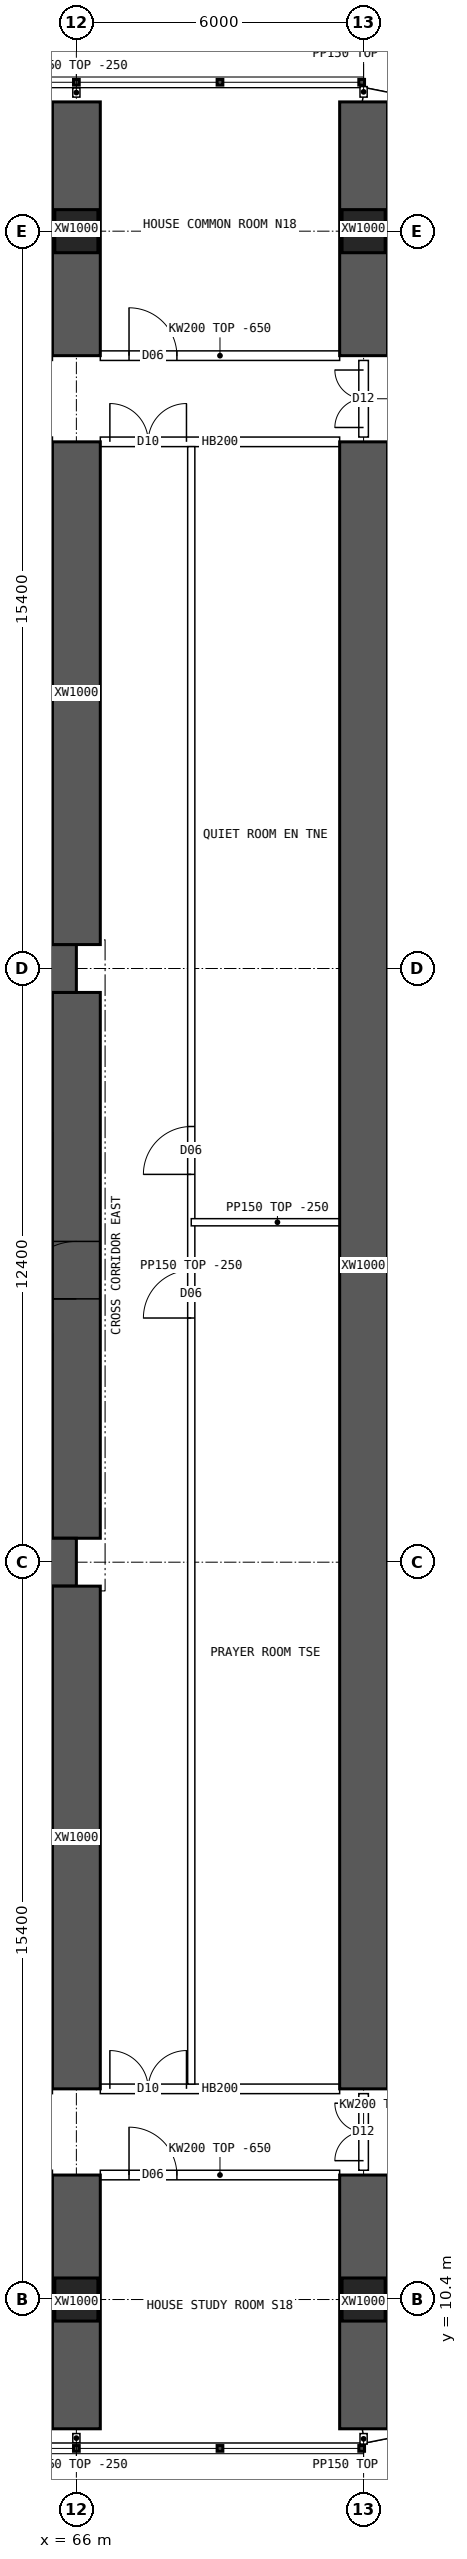
"""IFC4 building model, lengths in metres.
Left out: names, types, materials, properties, quantities, classifications, styles, units other than length and angle.
Written with IfcOpenShell. Run it as: python <this file> out.ifc"""

import sys

from ifc_helpers import new_model, si_unit, direction, frame, frame_2d, origin, origin_2d, place, context, subcontext, project, spatial, polyline, rectangle, hollow_rectangle, outline, extrude, element, fill, save


model = new_model("IFC4")
c1 = context("Model", 3, precision=1e-05, world=origin(), true_north=direction((0.0, 1.0)))
c2 = subcontext(c1, "Body", "Model", "MODEL_VIEW")
j1 = project(units=[si_unit("LENGTHUNIT", "METRE"), si_unit("PLANEANGLEUNIT", "RADIAN")], contexts=[c1])
p1 = place(None, origin())
s1 = spatial("IfcSite", under=j1, at=p1, CompositionType="ELEMENT")
p2 = place(p1, origin())
s2 = spatial("IfcBuilding", under=s1, at=p2, CompositionType="ELEMENT")
p3 = place(p2, frame((0.0, 0.0, 57.7)))
s3 = spatial("IfcBuildingStorey", under=s2, at=p3, CompositionType="ELEMENT", Elevation=57.7)
for number, where, z_axis, x_axis in (
    (1, (66.0, 10.4, 0.0), (0.0, 0.0, 1.0), (1.0, 0.0, 0.0)),
    (2, (66.0, 53.6, 0.0), (0.0, 0.0, 1.0), (1.0, 0.0, 0.0)),
    (3, (72.0, 10.4, 0.0), (0.0, 0.0, 1.0), (1.0, 0.0, 0.0)),
    (4, (72.0, 53.6, 0.0), (0.0, 0.0, 1.0), (1.0, 0.0, 0.0)),
):
    element("IfcColumn", number, at=place(p3, frame(where, z_axis=z_axis, x_axis=x_axis)), inside=s3, PredefinedType="COLUMN", context=c2, shape_type="SweptSolid", body=[
        extrude(hollow_rectangle(XDim=0.9, YDim=0.9, WallThickness=0.09, at=origin_2d()), origin(), (0.0, 0.0, 1.0), 3.75),
    ])
for number, where, z_axis, x_axis in (
    (5, (18.0, 25.8, 0.0), (0.0, 0.0, 1.0), (1.0, 0.0, 0.0)),
    (6, (18.0, 38.2, 0.0), (0.0, 0.0, 1.0), (1.0, 0.0, 0.0)),
):
    element("IfcWall", number, at=place(p3, frame(where, z_axis=z_axis, x_axis=x_axis)), inside=s3, PredefinedType="SHEAR", context=c2, shape_type="SweptSolid", body=[
        extrude(rectangle(XDim=48.0, YDim=1.0, at=frame_2d((24.0, 0.0))), origin(), (0.0, 0.0, 1.0), 3.75),
    ])
p4 = place(p3, frame((66.0, 26.3, 0.0), z_axis=(0.0, 0.0, 1.0), x_axis=(0.0, 1.0, 0.0)))
e7 = element("IfcWall", 7, at=p4, inside=s3, PredefinedType="SHEAR", context=c2, shape_type="SweptSolid", body=[
    extrude(rectangle(XDim=11.4, YDim=1.0, at=frame_2d((5.7, 0.0))), origin(), (0.0, 0.0, 1.0), 3.75),
])
p5 = place(p4, frame((5.0, 0.0, 0.0)))
e8 = element("IfcOpeningElement", 8, at=p5, cuts=e7, PredefinedType="OPENING", context=c2, shape_type="SweptSolid", body=[
    extrude(rectangle(XDim=1.2, YDim=2.1, at=frame_2d((0.6, 1.05))), frame((0.0, 0.51, 0.0), z_axis=(0.0, -1.0, 0.0), x_axis=(1.0, 0.0, 0.0)), (0.0, 0.0, 1.0), 1.02),
])
for number, where, z_axis, x_axis in (
    (9, (66.0, 7.7, 0.0), (0.0, 0.0, 1.0), (0.0, 1.0, 0.0)),
    (10, (66.0, 51.0, 0.0), (0.0, 0.0, 1.0), (0.0, 1.0, 0.0)),
):
    element("IfcWall", number, at=place(p3, frame(where, z_axis=z_axis, x_axis=x_axis)), inside=s3, PredefinedType="SHEAR", context=c2, shape_type="SweptSolid", body=[
        extrude(rectangle(XDim=5.3, YDim=1.0, at=frame_2d((2.65, 0.0))), origin(), (0.0, 0.0, 1.0), 3.75),
    ])
for number, where, z_axis, x_axis in (
    (11, (66.0, 14.8, 0.0), (0.0, 0.0, 1.0), (0.0, 1.0, 0.0)),
    (12, (66.0, 38.7, 0.0), (0.0, 0.0, 1.0), (0.0, 1.0, 0.0)),
):
    element("IfcWall", number, at=place(p3, frame(where, z_axis=z_axis, x_axis=x_axis)), inside=s3, PredefinedType="SHEAR", context=c2, shape_type="SweptSolid", body=[
        extrude(rectangle(XDim=10.5, YDim=1.0, at=frame_2d((5.25, 0.0))), origin(), (0.0, 0.0, 1.0), 3.75),
    ])
for number, where, z_axis, x_axis in (
    (13, (72.0, 7.7, 0.0), (0.0, 0.0, 1.0), (0.0, 1.0, 0.0)),
    (14, (72.0, 51.0, 0.0), (0.0, 0.0, 1.0), (0.0, 1.0, 0.0)),
):
    element("IfcWall", number, at=place(p3, frame(where, z_axis=z_axis, x_axis=x_axis)), inside=s3, PredefinedType="SHEAR", context=c2, shape_type="SweptSolid", body=[
        extrude(rectangle(XDim=5.3, YDim=1.0, at=frame_2d((2.65, 0.0))), origin(), (0.0, 0.0, 1.0), 3.75),
    ])
p6 = place(p3, frame((72.0, 14.8, 0.0), z_axis=(0.0, 0.0, 1.0), x_axis=(0.0, 1.0, 0.0)))
e15 = element("IfcWall", 15, at=p6, inside=s3, PredefinedType="SHEAR", context=c2, shape_type="SweptSolid", body=[
    extrude(rectangle(XDim=34.4, YDim=1.0, at=frame_2d((17.2, 0.0))), origin(), (0.0, 0.0, 1.0), 3.75),
])
p7 = place(p3, frame((72.0, 7.55, 0.0), z_axis=(0.0, 0.0, 1.0), x_axis=(0.980787251524, 0.195080412259, 0.0)))
e16 = element("IfcWall", 16, at=p7, inside=s3, PredefinedType="SOLIDWALL", context=c2, shape_type="SweptSolid", body=[
    extrude(outline(polyline([(-0.03, -0.15), (3.249, -0.15), (3.189, 0.15), (0.03, 0.15), (-0.03, -0.15)])), origin(), (0.0, 0.0, 1.0), 3.5),
])
p8 = place(p7, frame((0.909, 0.0, 0.9)))
e17 = element("IfcOpeningElement", 17, at=p8, cuts=e16, PredefinedType="OPENING", context=c2, shape_type="SweptSolid", body=[
    extrude(rectangle(XDim=1.4, YDim=1.8, at=frame_2d((0.7, 0.9))), frame((0.0, 0.16, 0.0), z_axis=(0.0, -1.0, 0.0), x_axis=(1.0, 0.0, 0.0)), (0.0, 0.0, 1.0), 0.32),
])
p9 = place(p3, frame((75.157, 55.822, 0.0), z_axis=(0.0, 0.0, 1.0), x_axis=(-0.980787251524, 0.195080412259, 0.0)))
e18 = element("IfcWall", 18, at=p9, inside=s3, PredefinedType="SOLIDWALL", context=c2, shape_type="SweptSolid", body=[
    extrude(outline(polyline([(-0.03, -0.15), (3.249, -0.15), (3.189, 0.15), (0.03, 0.15), (-0.03, -0.15)])), origin(), (0.0, 0.0, 1.0), 3.5),
])
p10 = place(p9, frame((0.909, 0.0, 0.9)))
e19 = element("IfcOpeningElement", 19, at=p10, cuts=e18, PredefinedType="OPENING", context=c2, shape_type="SweptSolid", body=[
    extrude(rectangle(XDim=1.4, YDim=1.8, at=frame_2d((0.7, 0.9))), frame((0.0, 0.16, 0.0), z_axis=(0.0, -1.0, 0.0), x_axis=(1.0, 0.0, 0.0)), (0.0, 0.0, 1.0), 0.32),
])
p11 = place(p3, frame((66.5, 13.0, 0.0), z_axis=(0.0, 0.0, 1.0), x_axis=(1.0, 0.0, 0.0)))
e20 = element("IfcWall", 20, at=p11, inside=s3, PredefinedType="SOLIDWALL", context=c2, shape_type="SweptSolid", body=[
    extrude(outline(polyline([(0.0, 0.0), (5.0, 0.0), (5.0, 3.1), (0.0, 3.1), (0.0, 0.0)])), frame((0.0, 0.1, 0.0), z_axis=(0.0, -1.0, 0.0), x_axis=(1.0, 0.0, 0.0)), (0.0, 0.0, 1.0), 0.2),
])
p12 = place(p11, frame((0.6, 0.0, 0.0)))
e21 = element("IfcOpeningElement", 21, at=p12, cuts=e20, PredefinedType="OPENING", context=c2, shape_type="SweptSolid", body=[
    extrude(rectangle(XDim=1.0, YDim=2.1, at=frame_2d((0.5, 1.05))), frame((0.0, 0.11, 0.0), z_axis=(0.0, -1.0, 0.0), x_axis=(1.0, 0.0, 0.0)), (0.0, 0.0, 1.0), 0.22),
])
p13 = place(p3, frame((66.5, 14.8, 0.0), z_axis=(0.0, 0.0, 1.0), x_axis=(1.0, 0.0, 0.0)))
e22 = element("IfcWall", 22, at=p13, inside=s3, PredefinedType="SOLIDWALL", context=c2, shape_type="SweptSolid", body=[
    extrude(rectangle(XDim=5.0, YDim=0.2, at=frame_2d((2.5, 0.0))), origin(), (0.0, 0.0, 1.0), 3.5),
])
p14 = place(p13, frame((0.2, 0.0, 0.0)))
e23 = element("IfcOpeningElement", 23, at=p14, cuts=e22, PredefinedType="OPENING", context=c2, shape_type="SweptSolid", body=[
    extrude(rectangle(XDim=1.6, YDim=2.1, at=frame_2d((0.8, 1.05))), frame((0.0, 0.11, 0.0), z_axis=(0.0, -1.0, 0.0), x_axis=(1.0, 0.0, 0.0)), (0.0, 0.0, 1.0), 0.22),
])
p15 = place(p3, frame((66.5, 51.0, 0.0), z_axis=(0.0, 0.0, 1.0), x_axis=(1.0, 0.0, 0.0)))
e24 = element("IfcWall", 24, at=p15, inside=s3, PredefinedType="SOLIDWALL", context=c2, shape_type="SweptSolid", body=[
    extrude(outline(polyline([(0.0, 0.0), (5.0, 0.0), (5.0, 3.1), (0.0, 3.1), (0.0, 0.0)])), frame((0.0, 0.1, 0.0), z_axis=(0.0, -1.0, 0.0), x_axis=(1.0, 0.0, 0.0)), (0.0, 0.0, 1.0), 0.2),
])
p16 = place(p15, frame((0.6, 0.0, 0.0)))
e25 = element("IfcOpeningElement", 25, at=p16, cuts=e24, PredefinedType="OPENING", context=c2, shape_type="SweptSolid", body=[
    extrude(rectangle(XDim=1.0, YDim=2.1, at=frame_2d((0.5, 1.05))), frame((0.0, 0.11, 0.0), z_axis=(0.0, -1.0, 0.0), x_axis=(1.0, 0.0, 0.0)), (0.0, 0.0, 1.0), 0.22),
])
p17 = place(p3, frame((66.5, 49.2, 0.0), z_axis=(0.0, 0.0, 1.0), x_axis=(1.0, 0.0, 0.0)))
e26 = element("IfcWall", 26, at=p17, inside=s3, PredefinedType="SOLIDWALL", context=c2, shape_type="SweptSolid", body=[
    extrude(rectangle(XDim=5.0, YDim=0.2, at=frame_2d((2.5, 0.0))), origin(), (0.0, 0.0, 1.0), 3.5),
])
p18 = place(p17, frame((0.2, 0.0, 0.0)))
e27 = element("IfcOpeningElement", 27, at=p18, cuts=e26, PredefinedType="OPENING", context=c2, shape_type="SweptSolid", body=[
    extrude(rectangle(XDim=1.6, YDim=2.1, at=frame_2d((0.8, 1.05))), frame((0.0, 0.11, 0.0), z_axis=(0.0, -1.0, 0.0), x_axis=(1.0, 0.0, 0.0)), (0.0, 0.0, 1.0), 0.22),
])
p19 = place(p3, frame((68.4, 14.9, 0.0), z_axis=(0.0, 0.0, 1.0), x_axis=(0.0, 1.0, 0.0)))
e28 = element("IfcWall", 28, at=p19, inside=s3, PredefinedType="PARTITIONING", context=c2, shape_type="SweptSolid", body=[
    extrude(rectangle(XDim=34.2, YDim=0.15, at=frame_2d((17.1, 0.0))), origin(), (0.0, 0.0, 1.0), 3.5),
])
p20 = place(p19, frame((16.0, 0.0, 0.0)))
e29 = element("IfcOpeningElement", 29, at=p20, cuts=e28, PredefinedType="OPENING", context=c2, shape_type="SweptSolid", body=[
    extrude(rectangle(XDim=1.0, YDim=2.1, at=frame_2d((0.5, 1.05))), frame((0.0, 0.085, 0.0), z_axis=(0.0, -1.0, 0.0), x_axis=(1.0, 0.0, 0.0)), (0.0, 0.0, 1.0), 0.17),
])
p21 = place(p19, frame((19.0, 0.0, 0.0)))
e30 = element("IfcOpeningElement", 30, at=p21, cuts=e28, PredefinedType="OPENING", context=c2, shape_type="SweptSolid", body=[
    extrude(rectangle(XDim=1.0, YDim=2.1, at=frame_2d((0.5, 1.05))), frame((0.0, 0.085, 0.0), z_axis=(0.0, -1.0, 0.0), x_axis=(1.0, 0.0, 0.0)), (0.0, 0.0, 1.0), 0.17),
])
p22 = place(p3, frame((68.4, 32.9, 0.0), z_axis=(0.0, 0.0, 1.0), x_axis=(1.0, 0.0, 0.0)))
e31 = element("IfcWall", 31, at=p22, inside=s3, PredefinedType="PARTITIONING", context=c2, shape_type="SweptSolid", body=[
    extrude(rectangle(XDim=3.6, YDim=0.15, at=frame_2d((1.8, 0.0))), origin(), (0.0, 0.0, 1.0), 3.5),
])
p23 = place(p3, frame((72.075, 30.85, 0.0), z_axis=(0.0, 0.0, 1.0), x_axis=(1.0, 0.0, 0.0)))
e32 = element("IfcWall", 32, at=p23, inside=s3, PredefinedType="PARTITIONING", context=c2, shape_type="SweptSolid", body=[
    extrude(outline(polyline([(0.0, 0.0), (8.02, 0.0), (8.02, 3.5), (6.227, 3.5), (6.225, 3.05), (5.627, 3.05), (5.625, 3.5), (0.0, 3.5), (0.0, 0.0)])), frame((0.0, 0.075, 0.0), z_axis=(0.0, -1.0, 0.0), x_axis=(1.0, 0.0, 0.0)), (0.0, 0.0, 1.0), 0.15),
])
p24 = place(p3, frame((72.0, 13.1, 0.0), z_axis=(0.0, 0.0, 1.0), x_axis=(0.0, 1.0, 0.0)))
e33 = element("IfcWall", 33, at=p24, inside=s3, PredefinedType="SOLIDWALL", context=c2, shape_type="SweptSolid", body=[
    extrude(outline(polyline([(0.0, 0.0), (1.6, 0.0), (1.6, 3.05), (0.0, 3.05), (0.0, 0.0)])), frame((0.0, 0.1, 0.0), z_axis=(0.0, -1.0, 0.0), x_axis=(1.0, 0.0, 0.0)), (0.0, 0.0, 1.0), 0.2),
])
p25 = place(p24, frame((0.2, 0.0, 0.0)))
e34 = element("IfcOpeningElement", 34, at=p25, cuts=e33, PredefinedType="OPENING", context=c2, shape_type="SweptSolid", body=[
    extrude(rectangle(XDim=1.2, YDim=2.1, at=frame_2d((0.6, 1.05))), frame((0.0, 0.11, 0.0), z_axis=(0.0, -1.0, 0.0), x_axis=(1.0, 0.0, 0.0)), (0.0, 0.0, 1.0), 0.22),
])
p26 = place(p3, frame((72.0, 49.3, 0.0), z_axis=(0.0, 0.0, 1.0), x_axis=(0.0, 1.0, 0.0)))
e35 = element("IfcWall", 35, at=p26, inside=s3, PredefinedType="SOLIDWALL", context=c2, shape_type="SweptSolid", body=[
    extrude(outline(polyline([(0.0, 0.0), (1.6, 0.0), (1.6, 3.05), (0.0, 3.05), (0.0, 0.0)])), frame((0.0, 0.1, 0.0), z_axis=(0.0, -1.0, 0.0), x_axis=(1.0, 0.0, 0.0)), (0.0, 0.0, 1.0), 0.2),
])
p27 = place(p26, frame((0.2, 0.0, 0.0)))
e36 = element("IfcOpeningElement", 36, at=p27, cuts=e35, PredefinedType="OPENING", context=c2, shape_type="SweptSolid", body=[
    extrude(rectangle(XDim=1.2, YDim=2.1, at=frame_2d((0.6, 1.05))), frame((0.0, 0.11, 0.0), z_axis=(0.0, -1.0, 0.0), x_axis=(1.0, 0.0, 0.0)), (0.0, 0.0, 1.0), 0.22),
])
for number, where, z_axis, x_axis in (
    (37, (66.0, 7.6, 0.0), (0.0, 0.0, 1.0), (0.0, -1.0, 0.0)),
    (38, (66.0, 56.4, 0.0), (0.0, 0.0, 1.0), (0.0, 1.0, 0.0)),
):
    element("IfcWall", number, at=place(p3, frame(where, z_axis=z_axis, x_axis=x_axis)), inside=s3, PredefinedType="PARTITIONING", context=c2, shape_type="SweptSolid", body=[
        extrude(rectangle(XDim=0.19, YDim=0.15, at=frame_2d((0.095, 0.0))), origin(), (0.0, 0.0, 1.0), 3.5),
    ])
for number, where, z_axis, x_axis in (
    (39, (72.0, 7.6, 0.0), (0.0, 0.0, 1.0), (0.0, -1.0, 0.0)),
    (40, (72.0, 56.4, 0.0), (0.0, 0.0, 1.0), (0.0, 1.0, 0.0)),
):
    element("IfcWall", number, at=place(p3, frame(where, z_axis=z_axis, x_axis=x_axis)), inside=s3, PredefinedType="PARTITIONING", context=c2, shape_type="SweptSolid", body=[
        extrude(rectangle(XDim=0.22, YDim=0.15, at=frame_2d((0.11, 0.0))), origin(), (0.0, 0.0, 1.0), 3.5),
    ])
p28 = place(p5, origin())
e41 = element("IfcDoor", 41, at=p28, inside=s3, OperationType="SINGLE_SWING_LEFT", PredefinedType="DOOR", context=c2, shape_type="SweptSolid", body=[
    extrude(rectangle(XDim=1.2, YDim=2.1, at=frame_2d((0.6, 1.05))), frame((0.0, 0.025, 0.0), z_axis=(0.0, -1.0, 0.0), x_axis=(1.0, 0.0, 0.0)), (0.0, 0.0, 1.0), 0.05),
])
fill(e8, e41)
p29 = place(p14, origin())
e42 = element("IfcDoor", 42, at=p29, inside=s3, OperationType="DOUBLE_DOOR_SINGLE_SWING", PredefinedType="DOOR", context=c2, shape_type="SweptSolid", body=[
    extrude(rectangle(XDim=1.6, YDim=2.1, at=frame_2d((0.8, 1.05))), frame((0.0, 0.025, 0.0), z_axis=(0.0, -1.0, 0.0), x_axis=(1.0, 0.0, 0.0)), (0.0, 0.0, 1.0), 0.05),
])
fill(e23, e42)
p30 = place(p18, origin())
e43 = element("IfcDoor", 43, at=p30, inside=s3, OperationType="DOUBLE_DOOR_SINGLE_SWING", PredefinedType="DOOR", context=c2, shape_type="SweptSolid", body=[
    extrude(rectangle(XDim=1.6, YDim=2.1, at=frame_2d((0.8, 1.05))), frame((0.0, 0.025, 0.0), z_axis=(0.0, -1.0, 0.0), x_axis=(1.0, 0.0, 0.0)), (0.0, 0.0, 1.0), 0.05),
])
fill(e27, e43)
p31 = place(p12, origin())
e44 = element("IfcDoor", 44, at=p31, inside=s3, OperationType="SINGLE_SWING_LEFT", PredefinedType="DOOR", context=c2, shape_type="SweptSolid", body=[
    extrude(rectangle(XDim=1.0, YDim=2.1, at=frame_2d((0.5, 1.05))), frame((0.0, 0.025, 0.0), z_axis=(0.0, -1.0, 0.0), x_axis=(1.0, 0.0, 0.0)), (0.0, 0.0, 1.0), 0.05),
])
fill(e21, e44)
p32 = place(p16, origin())
e45 = element("IfcDoor", 45, at=p32, inside=s3, OperationType="SINGLE_SWING_LEFT", PredefinedType="DOOR", context=c2, shape_type="SweptSolid", body=[
    extrude(rectangle(XDim=1.0, YDim=2.1, at=frame_2d((0.5, 1.05))), frame((0.0, 0.025, 0.0), z_axis=(0.0, -1.0, 0.0), x_axis=(1.0, 0.0, 0.0)), (0.0, 0.0, 1.0), 0.05),
])
fill(e25, e45)
p33 = place(p20, origin())
e46 = element("IfcDoor", 46, at=p33, inside=s3, OperationType="SINGLE_SWING_LEFT", PredefinedType="DOOR", context=c2, shape_type="SweptSolid", body=[
    extrude(rectangle(XDim=1.0, YDim=2.1, at=frame_2d((0.5, 1.05))), frame((0.0, 0.025, 0.0), z_axis=(0.0, -1.0, 0.0), x_axis=(1.0, 0.0, 0.0)), (0.0, 0.0, 1.0), 0.05),
])
fill(e29, e46)
p34 = place(p21, origin())
e47 = element("IfcDoor", 47, at=p34, inside=s3, OperationType="SINGLE_SWING_LEFT", PredefinedType="DOOR", context=c2, shape_type="SweptSolid", body=[
    extrude(rectangle(XDim=1.0, YDim=2.1, at=frame_2d((0.5, 1.05))), frame((0.0, 0.025, 0.0), z_axis=(0.0, -1.0, 0.0), x_axis=(1.0, 0.0, 0.0)), (0.0, 0.0, 1.0), 0.05),
])
fill(e30, e47)
p35 = place(p25, origin())
e48 = element("IfcDoor", 48, at=p35, inside=s3, OperationType="DOUBLE_DOOR_SINGLE_SWING", PredefinedType="DOOR", context=c2, shape_type="SweptSolid", body=[
    extrude(rectangle(XDim=1.2, YDim=2.1, at=frame_2d((0.6, 1.05))), frame((0.0, 0.025, 0.0), z_axis=(0.0, -1.0, 0.0), x_axis=(1.0, 0.0, 0.0)), (0.0, 0.0, 1.0), 0.05),
])
fill(e34, e48)
p36 = place(p27, origin())
e49 = element("IfcDoor", 49, at=p36, inside=s3, OperationType="DOUBLE_DOOR_SINGLE_SWING", PredefinedType="DOOR", context=c2, shape_type="SweptSolid", body=[
    extrude(rectangle(XDim=1.2, YDim=2.1, at=frame_2d((0.6, 1.05))), frame((0.0, 0.025, 0.0), z_axis=(0.0, -1.0, 0.0), x_axis=(1.0, 0.0, 0.0)), (0.0, 0.0, 1.0), 0.05),
])
fill(e36, e49)
save(model, sys.argv[1])
